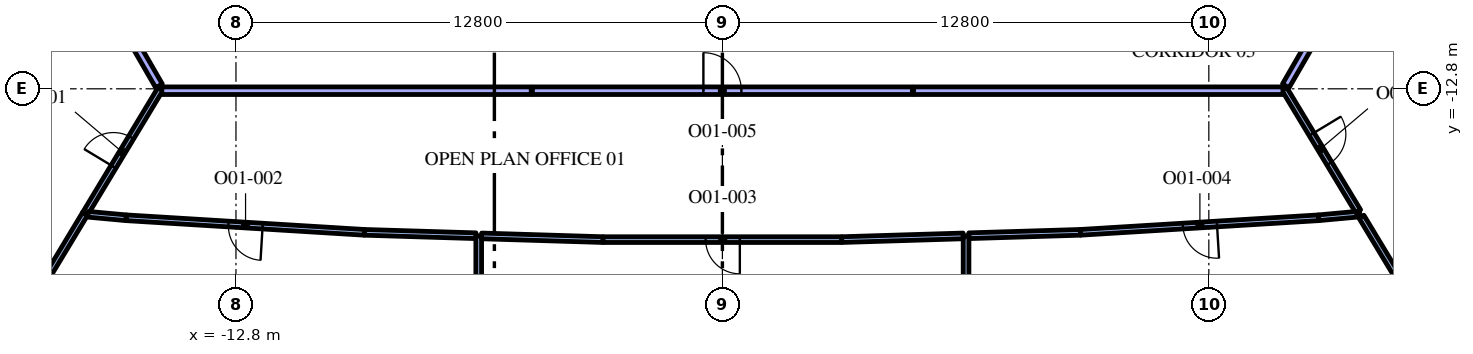
"""IFC4 building model, lengths in metres.
Left out: names, types, materials, properties, quantities, classifications, styles, units other than length and angle.
Written with IfcOpenShell. Run it as: python <this file> out.ifc"""

import sys

from ifc_helpers import new_model, si_unit, direction, frame, frame_2d, origin, place, context, subcontext, project, spatial, rectangle, extrude, element, fill, save


model = new_model("IFC4")
c1 = context("Model", 3, precision=1e-05, world=origin(), true_north=direction((0.0, 1.0)))
c2 = subcontext(c1, "Body", "Model", "MODEL_VIEW")
j1 = project(units=[si_unit("LENGTHUNIT", "METRE"), si_unit("PLANEANGLEUNIT", "RADIAN")], contexts=[c1])
p1 = place(None, origin())
s1 = spatial("IfcSite", under=j1, at=p1, CompositionType="ELEMENT")
p2 = place(p1, origin())
s2 = spatial("IfcBuilding", under=s1, at=p2, CompositionType="ELEMENT")
p3 = place(p2, frame((0.0, 0.0, 150.0)))
s3 = spatial("IfcBuildingStorey", under=s2, at=p3, CompositionType="ELEMENT", Elevation=150.0)
p4 = place(p3, frame((-16.771, -16.09, 0.0), z_axis=(0.0, 0.0, 1.0), x_axis=(-0.516817512045, -0.856095590015, 0.0)))
e1 = element("IfcWall", 1, at=p4, inside=s3, PredefinedType="PARTITIONING", context=c2, shape_type="SweptSolid", body=[
    extrude(rectangle(XDim=4.45, YDim=0.15, at=frame_2d((2.225, 0.0))), origin(), (0.0, 0.0, 1.0), 3.15),
])
p5 = place(p3, frame((-16.775, -16.097, 0.0), z_axis=(0.0, 0.0, 1.0), x_axis=(0.516793803756, 0.856109902057, 0.0)))
e2 = element("IfcWall", 2, at=p5, inside=s3, PredefinedType="PARTITIONING", context=c2, shape_type="SweptSolid", body=[
    extrude(rectangle(XDim=3.856, YDim=0.15, at=frame_2d((1.928, 0.0))), origin(), (0.0, 0.0, 1.0), 3.15),
])
p6 = place(p5, frame((1.456, 0.0, 0.0)))
e3 = element("IfcOpeningElement", 3, at=p6, cuts=e2, PredefinedType="OPENING", context=c2, shape_type="SweptSolid", body=[
    extrude(rectangle(XDim=0.9, YDim=2.1, at=frame_2d((0.45, 1.05))), frame((0.0, 0.085, 0.0), z_axis=(0.0, -1.0, 0.0), x_axis=(1.0, 0.0, 0.0)), (0.0, 0.0, 1.0), 0.17),
])
p7 = place(p3, frame((-25.421, -14.677, 0.0), z_axis=(0.0, 0.0, 1.0), x_axis=(0.866031435434, 0.499989552732, 0.0)))
e4 = element("IfcWall", 4, at=p7, inside=s3, PredefinedType="PARTITIONING", context=c2, shape_type="SweptSolid", body=[
    extrude(rectangle(XDim=10.154, YDim=0.2, at=frame_2d((5.077, 0.0))), origin(), (0.0, 0.0, 1.0), 3.15),
])
p8 = place(p3, frame((-16.578, -9.687, 0.0), z_axis=(0.0, 0.0, 1.0), x_axis=(0.499981686864, -0.86603597662, 0.0)))
e5 = element("IfcWall", 5, at=p8, inside=s3, PredefinedType="PARTITIONING", context=c2, shape_type="SweptSolid", body=[
    extrude(rectangle(XDim=3.506, YDim=0.2, at=frame_2d((1.753, 0.0))), origin(), (0.0, 0.0, 1.0), 3.15),
])
p9 = place(p3, frame((-6.412, -16.668, 0.0), z_axis=(0.0, 0.0, 1.0), x_axis=(0.0, -1.0, 0.0)))
e6 = element("IfcWall", 6, at=p9, inside=s3, PredefinedType="PARTITIONING", context=c2, shape_type="SweptSolid", body=[
    extrude(rectangle(XDim=4.002, YDim=0.15, at=frame_2d((2.001, 0.0))), origin(), (0.0, 0.0, 1.0), 3.15),
])
p10 = place(p3, frame((-16.69, -16.102, 0.0), z_axis=(0.0, 0.0, 1.0), x_axis=(0.995818997537, -0.091348366946, 0.0)))
e7 = element("IfcWall", 7, at=p10, inside=s3, PredefinedType="PARTITIONING", context=c2, shape_type="SweptSolid", body=[
    extrude(rectangle(XDim=1.002, YDim=0.15, at=frame_2d((0.501, 0.0))), origin(), (0.0, 0.0, 1.0), 3.15),
])
p11 = place(p3, frame((-9.421, -16.576, 0.0), z_axis=(0.0, 0.0, 1.0), x_axis=(-0.998137075468, 0.061011298754, 0.0)))
e8 = element("IfcWall", 8, at=p11, inside=s3, PredefinedType="PARTITIONING", context=c2, shape_type="SweptSolid", body=[
    extrude(rectangle(XDim=6.282, YDim=0.15, at=frame_2d((3.141, 0.0))), origin(), (0.0, 0.0, 1.0), 3.15),
])
p12 = place(p11, frame((2.683, 0.0, 0.0)))
e9 = element("IfcOpeningElement", 9, at=p12, cuts=e8, PredefinedType="OPENING", context=c2, shape_type="SweptSolid", body=[
    extrude(rectangle(XDim=0.9, YDim=2.1, at=frame_2d((0.45, 1.05))), frame((0.0, 0.085, 0.0), z_axis=(0.0, -1.0, 0.0), x_axis=(1.0, 0.0, 0.0)), (0.0, 0.0, 1.0), 0.17),
])
p13 = place(p3, frame((-9.421, -16.576, 0.0), z_axis=(0.0, 0.0, 1.0), x_axis=(0.999533978083, -0.030525835896, 0.0)))
e10 = element("IfcWall", 10, at=p13, inside=s3, PredefinedType="PARTITIONING", context=c2, shape_type="SweptSolid", body=[
    extrude(rectangle(XDim=2.935, YDim=0.15, at=frame_2d((1.468, 0.0))), origin(), (0.0, 0.0, 1.0), 3.15),
])
p14 = place(p3, frame((6.412, -16.668, 0.0), z_axis=(0.0, 0.0, 1.0), x_axis=(0.0, -1.0, 0.0)))
e11 = element("IfcWall", 11, at=p14, inside=s3, PredefinedType="PARTITIONING", context=c2, shape_type="SweptSolid", body=[
    extrude(rectangle(XDim=4.002, YDim=0.15, at=frame_2d((2.001, 0.0))), origin(), (0.0, 0.0, 1.0), 3.15),
])
p15 = place(p3, frame((-6.337, -16.671, 0.0), z_axis=(0.0, 0.0, 1.0), x_axis=(0.999533369646, -0.030545751995, 0.0)))
e12 = element("IfcWall", 12, at=p15, inside=s3, PredefinedType="PARTITIONING", context=c2, shape_type="SweptSolid", body=[
    extrude(rectangle(XDim=3.197, YDim=0.15, at=frame_2d((1.599, 0.0))), origin(), (0.0, 0.0, 1.0), 3.15),
])
p16 = place(p3, frame((3.141, -16.768, 0.0), z_axis=(0.0, 0.0, 1.0), x_axis=(-1.0, 0.0, 0.0)))
e13 = element("IfcWall", 13, at=p16, inside=s3, PredefinedType="PARTITIONING", context=c2, shape_type="SweptSolid", body=[
    extrude(rectangle(XDim=6.283, YDim=0.15, at=frame_2d((3.141, 0.0))), origin(), (0.0, 0.0, 1.0), 3.15),
])
p17 = place(p16, frame((2.683, 0.0, 0.0)))
e14 = element("IfcOpeningElement", 14, at=p17, cuts=e13, PredefinedType="OPENING", context=c2, shape_type="SweptSolid", body=[
    extrude(rectangle(XDim=0.9, YDim=2.1, at=frame_2d((0.45, 1.05))), frame((0.0, 0.085, 0.0), z_axis=(0.0, -1.0, 0.0), x_axis=(1.0, 0.0, 0.0)), (0.0, 0.0, 1.0), 0.17),
])
p18 = place(p3, frame((3.141, -16.768, 0.0), z_axis=(0.0, 0.0, 1.0), x_axis=(0.999533369646, 0.030545751995, 0.0)))
e15 = element("IfcWall", 15, at=p18, inside=s3, PredefinedType="PARTITIONING", context=c2, shape_type="SweptSolid", body=[
    extrude(rectangle(XDim=3.197, YDim=0.15, at=frame_2d((1.599, 0.0))), origin(), (0.0, 0.0, 1.0), 3.15),
])
p19 = place(p3, frame((6.487, -16.666, 0.0), z_axis=(0.0, 0.0, 1.0), x_axis=(0.999533978083, 0.030525835896, 0.0)))
e16 = element("IfcWall", 16, at=p19, inside=s3, PredefinedType="PARTITIONING", context=c2, shape_type="SweptSolid", body=[
    extrude(rectangle(XDim=2.935, YDim=0.15, at=frame_2d((1.468, 0.0))), origin(), (0.0, 0.0, 1.0), 3.15),
])
p20 = place(p3, frame((15.692, -16.193, 0.0), z_axis=(0.0, 0.0, 1.0), x_axis=(-0.998137075468, -0.061011298754, 0.0)))
e17 = element("IfcWall", 17, at=p20, inside=s3, PredefinedType="PARTITIONING", context=c2, shape_type="SweptSolid", body=[
    extrude(rectangle(XDim=6.282, YDim=0.15, at=frame_2d((3.141, 0.0))), origin(), (0.0, 0.0, 1.0), 3.15),
])
p21 = place(p20, frame((2.683, 0.0, 0.0)))
e18 = element("IfcOpeningElement", 18, at=p21, cuts=e17, PredefinedType="OPENING", context=c2, shape_type="SweptSolid", body=[
    extrude(rectangle(XDim=0.9, YDim=2.1, at=frame_2d((0.45, 1.05))), frame((0.0, 0.085, 0.0), z_axis=(0.0, -1.0, 0.0), x_axis=(1.0, 0.0, 0.0)), (0.0, 0.0, 1.0), 0.17),
])
p22 = place(p3, frame((15.692, -16.193, 0.0), z_axis=(0.0, 0.0, 1.0), x_axis=(0.995822859979, 0.091306251389, 0.0)))
e19 = element("IfcWall", 19, at=p22, inside=s3, PredefinedType="PARTITIONING", context=c2, shape_type="SweptSolid", body=[
    extrude(rectangle(XDim=1.086, YDim=0.15, at=frame_2d((0.543, 0.0))), origin(), (0.0, 0.0, 1.0), 3.15),
])
p23 = place(p3, frame((16.816, -16.165, 0.0), z_axis=(0.0, 0.0, 1.0), x_axis=(0.516814925326, -0.85609715159, 0.0)))
e20 = element("IfcWall", 20, at=p23, inside=s3, PredefinedType="PARTITIONING", context=c2, shape_type="SweptSolid", body=[
    extrude(rectangle(XDim=4.362, YDim=0.15, at=frame_2d((2.181, 0.0))), origin(), (0.0, 0.0, 1.0), 3.15),
])
p24 = place(p3, frame((14.782, -12.796, 0.0), z_axis=(0.0, 0.0, 1.0), x_axis=(0.516809076879, -0.856100682196, 0.0)))
e21 = element("IfcWall", 21, at=p24, inside=s3, PredefinedType="PARTITIONING", context=c2, shape_type="SweptSolid", body=[
    extrude(rectangle(XDim=3.768, YDim=0.15, at=frame_2d((1.884, 0.0))), origin(), (0.0, 0.0, 1.0), 3.15),
])
p25 = place(p24, frame((1.4, 0.0, 0.0)))
e22 = element("IfcOpeningElement", 22, at=p25, cuts=e21, PredefinedType="OPENING", context=c2, shape_type="SweptSolid", body=[
    extrude(rectangle(XDim=0.9, YDim=2.1, at=frame_2d((0.45, 1.05))), frame((0.0, 0.085, 0.0), z_axis=(0.0, -1.0, 0.0), x_axis=(1.0, 0.0, 0.0)), (0.0, 0.0, 1.0), 0.17),
])
p26 = place(p3, frame((-5.0, -12.85, 0.0), z_axis=(0.0, 0.0, 1.0), x_axis=(1.0, 0.0, 0.0)))
e23 = element("IfcWall", 23, at=p26, inside=s3, PredefinedType="PARTITIONING", context=c2, shape_type="SweptSolid", body=[
    extrude(rectangle(XDim=10.0, YDim=0.2, at=frame_2d((5.0, 0.0))), origin(), (0.0, 0.0, 1.0), 3.15),
])
p27 = place(p26, frame((4.5, 0.0, 0.0)))
e24 = element("IfcOpeningElement", 24, at=p27, cuts=e23, PredefinedType="OPENING", context=c2, shape_type="SweptSolid", body=[
    extrude(rectangle(XDim=1.0, YDim=2.1, at=frame_2d((0.5, 1.05))), frame((0.0, 0.11, 0.0), z_axis=(0.0, -1.0, 0.0), x_axis=(1.0, 0.0, 0.0)), (0.0, 0.0, 1.0), 0.22),
])
for number, where, z_axis, x_axis in (
    (25, (-14.751, -12.85, 0.0), (0.0, 0.0, 1.0), (1.0, 0.0, 0.0)),
    (26, (5.03, -12.85, 0.0), (0.0, 0.0, 1.0), (1.0, 0.0, 0.0)),
):
    element("IfcWall", number, at=place(p3, frame(where, z_axis=z_axis, x_axis=x_axis)), inside=s3, PredefinedType="PARTITIONING", context=c2, shape_type="SweptSolid", body=[
        extrude(rectangle(XDim=9.721, YDim=0.2, at=frame_2d((4.861, 0.0))), origin(), (0.0, 0.0, 1.0), 3.15),
    ])
p28 = place(p3, frame((16.628, -9.6, 0.0), z_axis=(0.0, 0.0, 1.0), x_axis=(0.866031435434, -0.499989552732, 0.0)))
e27 = element("IfcWall", 27, at=p28, inside=s3, PredefinedType="PARTITIONING", context=c2, shape_type="SweptSolid", body=[
    extrude(rectangle(XDim=10.154, YDim=0.2, at=frame_2d((5.077, 0.0))), origin(), (0.0, 0.0, 1.0), 3.15),
])
p29 = place(p3, frame((14.825, -12.722, 0.0), z_axis=(0.0, 0.0, 1.0), x_axis=(0.499981686864, 0.86603597662, 0.0)))
e28 = element("IfcWall", 28, at=p29, inside=s3, PredefinedType="PARTITIONING", context=c2, shape_type="SweptSolid", body=[
    extrude(rectangle(XDim=3.506, YDim=0.2, at=frame_2d((1.753, 0.0))), origin(), (0.0, 0.0, 1.0), 3.15),
])
p30 = place(p6, origin())
e29 = element("IfcDoor", 29, at=p30, inside=s3, OperationType="SINGLE_SWING_LEFT", PredefinedType="DOOR", context=c2, shape_type="SweptSolid", body=[
    extrude(rectangle(XDim=0.9, YDim=2.1, at=frame_2d((0.45, 1.05))), frame((0.0, 0.025, 0.0), z_axis=(0.0, -1.0, 0.0), x_axis=(1.0, 0.0, 0.0)), (0.0, 0.0, 1.0), 0.05),
])
fill(e3, e29)
p31 = place(p12, origin())
e30 = element("IfcDoor", 30, at=p31, inside=s3, OperationType="SINGLE_SWING_LEFT", PredefinedType="DOOR", context=c2, shape_type="SweptSolid", body=[
    extrude(rectangle(XDim=0.9, YDim=2.1, at=frame_2d((0.45, 1.05))), frame((0.0, 0.025, 0.0), z_axis=(0.0, -1.0, 0.0), x_axis=(1.0, 0.0, 0.0)), (0.0, 0.0, 1.0), 0.05),
])
fill(e9, e30)
p32 = place(p17, origin())
e31 = element("IfcDoor", 31, at=p32, inside=s3, OperationType="SINGLE_SWING_LEFT", PredefinedType="DOOR", context=c2, shape_type="SweptSolid", body=[
    extrude(rectangle(XDim=0.9, YDim=2.1, at=frame_2d((0.45, 1.05))), frame((0.0, 0.025, 0.0), z_axis=(0.0, -1.0, 0.0), x_axis=(1.0, 0.0, 0.0)), (0.0, 0.0, 1.0), 0.05),
])
fill(e14, e31)
p33 = place(p21, origin())
e32 = element("IfcDoor", 32, at=p33, inside=s3, OperationType="SINGLE_SWING_LEFT", PredefinedType="DOOR", context=c2, shape_type="SweptSolid", body=[
    extrude(rectangle(XDim=0.9, YDim=2.1, at=frame_2d((0.45, 1.05))), frame((0.0, 0.025, 0.0), z_axis=(0.0, -1.0, 0.0), x_axis=(1.0, 0.0, 0.0)), (0.0, 0.0, 1.0), 0.05),
])
fill(e18, e32)
p34 = place(p27, origin())
e33 = element("IfcDoor", 33, at=p34, inside=s3, OperationType="SINGLE_SWING_RIGHT", PredefinedType="DOOR", context=c2, shape_type="SweptSolid", body=[
    extrude(rectangle(XDim=1.0, YDim=2.1, at=frame_2d((0.5, 1.05))), frame((0.0, 0.025, 0.0), z_axis=(0.0, -1.0, 0.0), x_axis=(1.0, 0.0, 0.0)), (0.0, 0.0, 1.0), 0.05),
])
fill(e24, e33)
p35 = place(p25, origin())
e34 = element("IfcDoor", 34, at=p35, inside=s3, OperationType="SINGLE_SWING_LEFT", PredefinedType="DOOR", context=c2, shape_type="SweptSolid", body=[
    extrude(rectangle(XDim=0.9, YDim=2.1, at=frame_2d((0.45, 1.05))), frame((0.0, 0.025, 0.0), z_axis=(0.0, -1.0, 0.0), x_axis=(1.0, 0.0, 0.0)), (0.0, 0.0, 1.0), 0.05),
])
fill(e22, e34)
save(model, sys.argv[1])
